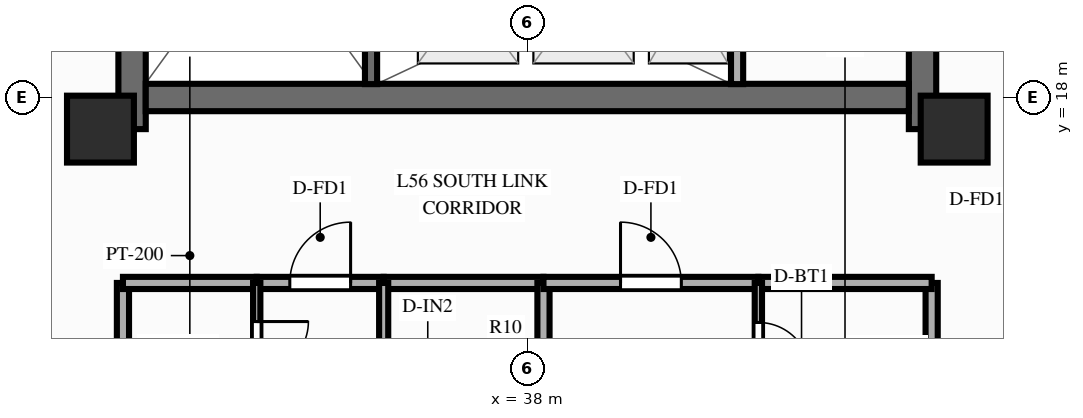
"""IFC4 building model, lengths in metres.
Left out: names, types, materials, properties, quantities, classifications, styles, units other than length and angle.
Written with IfcOpenShell. Run it as: python <this file> out.ifc"""

import sys

from ifc_helpers import new_model, si_unit, direction, frame, frame_2d, origin, origin_2d, place, context, subcontext, project, spatial, rectangle, extrude, source, transform, mapped, element, fill, save


model = new_model("IFC4")
c1 = context("Model", 3, precision=1e-05, world=origin(), true_north=direction((0.0, 1.0)))
c2 = subcontext(c1, "Body", "Model", "MODEL_VIEW")
j1 = project(units=[si_unit("LENGTHUNIT", "METRE"), si_unit("PLANEANGLEUNIT", "RADIAN")], contexts=[c1])
p1 = place(None, origin())
s1 = spatial("IfcSite", under=j1, at=p1, CompositionType="ELEMENT")
p2 = place(p1, origin())
s2 = spatial("IfcBuilding", under=s1, at=p2, CompositionType="ELEMENT")
p3 = place(p2, frame((0.0, 0.0, 179.8)))
s3 = spatial("IfcBuildingStorey", under=s2, at=p3, CompositionType="ELEMENT", Elevation=179.8)
p4 = place(p3, frame((31.5, 17.48, 0.0), z_axis=(0.0, 0.0, 1.0), x_axis=(0.0, 1.0, 0.0)))
e1 = element("IfcWall", 1, at=p4, inside=s3, PredefinedType="SHEAR", context=c2, shape_type="SweptSolid", body=[
    extrude(rectangle(XDim=19.04, YDim=0.45, at=frame_2d((9.52, 0.0))), origin(), (0.0, 0.0, 1.0), 3.0),
])
p5 = place(p4, frame((6.32, 0.0, 0.0)))
e2 = element("IfcOpeningElement", 2, at=p5, cuts=e1, PredefinedType="OPENING", context=c2, shape_type="SweptSolid", body=[
    extrude(rectangle(XDim=1.1, YDim=2.15, at=frame_2d((0.55, 1.075))), frame((0.0, 0.237, 0.0), z_axis=(0.0, -1.0, 0.0), x_axis=(1.0, 0.0, 0.0)), (0.0, 0.0, 1.0), 0.474),
])
p6 = place(p3, frame((44.5, 17.48, 0.0), z_axis=(0.0, 0.0, 1.0), x_axis=(0.0, 1.0, 0.0)))
e3 = element("IfcWall", 3, at=p6, inside=s3, PredefinedType="SHEAR", context=c2, shape_type="SweptSolid", body=[
    extrude(rectangle(XDim=19.04, YDim=0.45, at=frame_2d((9.52, 0.0))), origin(), (0.0, 0.0, 1.0), 3.0),
])
p7 = place(p6, frame((12.67, 0.0, 0.0), z_axis=(0.0, 0.0, 1.0), x_axis=(-1.0, 0.0, 0.0)))
e4 = element("IfcOpeningElement", 4, at=p7, cuts=e3, PredefinedType="OPENING", context=c2, shape_type="SweptSolid", body=[
    extrude(rectangle(XDim=1.1, YDim=2.15, at=frame_2d((0.55, 1.075))), frame((0.0, 0.237, 0.0), z_axis=(0.0, -1.0, 0.0), x_axis=(1.0, 0.0, 0.0)), (0.0, 0.0, 1.0), 0.474),
])
p8 = place(p3, frame((31.725, 18.0, 0.0), z_axis=(0.0, 0.0, 1.0), x_axis=(1.0, 0.0, 0.0)))
e5 = element("IfcWall", 5, at=p8, inside=s3, PredefinedType="SHEAR", context=c2, shape_type="SweptSolid", body=[
    extrude(rectangle(XDim=12.55, YDim=0.45, at=frame_2d((6.275, 0.0))), origin(), (0.0, 0.0, 1.0), 3.0),
])
m1 = source(origin(), c2, "Body", "SweptSolid", [
    extrude(rectangle(XDim=1.1, YDim=1.1, at=origin_2d()), origin(), (0.0, 0.0, 1.0), 3.0),
])
for number, where, z_axis, x_axis in (
    (6, (30.98, 17.48, 0.0), (0.0, 0.0, 1.0), (1.0, 0.0, 0.0)),
    (7, (45.02, 17.48, 0.0), (0.0, 0.0, 1.0), (1.0, 0.0, 0.0)),
):
    element("IfcColumn", number, at=place(p3, frame(where, z_axis=z_axis, x_axis=x_axis)), inside=s3, PredefinedType="COLUMN", context=c2, shape_type="MappedRepresentation", body=[
        mapped(m1, transform((0.0, 0.0, 0.0), scale=1.0)),
    ])
p9 = place(p3, frame((41.45, 18.22, 0.0), z_axis=(0.0, 0.0, 1.0), x_axis=(0.0, 1.0, 0.0)))
e8 = element("IfcWall", 8, at=p9, inside=s3, PredefinedType="PARTITIONING", context=c2, shape_type="SweptSolid", body=[
    extrude(rectangle(XDim=2.86, YDim=0.2, at=frame_2d((1.43, 0.0))), origin(), (0.0, 0.0, 1.0), 2.79),
])
p10 = place(p3, frame((35.43, 18.22, 0.0), z_axis=(0.0, 0.0, 1.0), x_axis=(0.0, 1.0, 0.0)))
e9 = element("IfcWall", 9, at=p10, inside=s3, PredefinedType="SOLIDWALL", context=c2, shape_type="SweptSolid", body=[
    extrude(rectangle(XDim=7.22, YDim=0.2, at=frame_2d((3.61, 0.0))), origin(), (0.0, 0.0, 1.0), 2.79),
])
p11 = place(p10, frame((6.68, 0.0, 0.0), z_axis=(0.0, 0.0, 1.0), x_axis=(-1.0, 0.0, 0.0)))
e10 = element("IfcOpeningElement", 10, at=p11, cuts=e9, PredefinedType="OPENING", context=c2, shape_type="SweptSolid", body=[
    extrude(rectangle(XDim=1.1, YDim=2.15, at=frame_2d((0.55, 1.075))), frame((0.0, 0.112, 0.0), z_axis=(0.0, -1.0, 0.0), x_axis=(1.0, 0.0, 0.0)), (0.0, 0.0, 1.0), 0.224),
])
for number, where, z_axis, x_axis in (
    (11, (31.35, 14.95, 0.0), (0.0, 0.0, 1.0), (0.0, -1.0, 0.0)),
    (12, (44.65, 14.95, 0.0), (0.0, 0.0, 1.0), (0.0, -1.0, 0.0)),
):
    element("IfcWall", number, at=place(p3, frame(where, z_axis=z_axis, x_axis=x_axis)), inside=s3, PredefinedType="PARTITIONING", context=c2, shape_type="SweptSolid", body=[
        extrude(rectangle(XDim=8.8, YDim=0.2, at=frame_2d((4.4, 0.0))), origin(), (0.0, 0.0, 1.0), 2.39),
    ])
p12 = place(p3, frame((31.35, 14.95, 0.0), z_axis=(0.0, 0.0, 1.0), x_axis=(1.0, 0.0, 0.0)))
e13 = element("IfcWall", 13, at=p12, inside=s3, PredefinedType="PARTITIONING", context=c2, shape_type="SweptSolid", body=[
    extrude(rectangle(XDim=2.2, YDim=0.2, at=frame_2d((1.1, 0.0))), origin(), (0.0, 0.0, 1.0), 2.79),
])
p13 = place(p3, frame((33.55, 14.95, 0.0), z_axis=(0.0, 0.0, 1.0), x_axis=(1.0, 0.0, 0.0)))
e14 = element("IfcWall", 14, at=p13, inside=s3, PredefinedType="PARTITIONING", context=c2, shape_type="SweptSolid", body=[
    extrude(rectangle(XDim=2.088, YDim=0.2, at=frame_2d((1.044, 0.0))), origin(), (0.0, 0.0, 1.0), 2.79),
])
p14 = place(p13, frame((0.544, 0.0, 0.0)))
e15 = element("IfcOpeningElement", 15, at=p14, cuts=e14, PredefinedType="OPENING", context=c2, shape_type="SweptSolid", body=[
    extrude(rectangle(XDim=1.0, YDim=2.15, at=frame_2d((0.5, 1.075))), frame((0.0, 0.112, 0.0), z_axis=(0.0, -1.0, 0.0), x_axis=(1.0, 0.0, 0.0)), (0.0, 0.0, 1.0), 0.224),
])
p15 = place(p3, frame((35.638, 14.95, 0.0), z_axis=(0.0, 0.0, 1.0), x_axis=(1.0, 0.0, 0.0)))
e16 = element("IfcWall", 16, at=p15, inside=s3, PredefinedType="PARTITIONING", context=c2, shape_type="SweptSolid", body=[
    extrude(rectangle(XDim=2.628, YDim=0.2, at=frame_2d((1.314, 0.0))), origin(), (0.0, 0.0, 1.0), 2.79),
])
p16 = place(p3, frame((33.55, 14.95, 0.0), z_axis=(0.0, 0.0, 1.0), x_axis=(0.0, -1.0, 0.0)))
e17 = element("IfcWall", 17, at=p16, inside=s3, PredefinedType="PARTITIONING", context=c2, shape_type="SweptSolid", body=[
    extrude(rectangle(XDim=2.12, YDim=0.12, at=frame_2d((1.06, 0.0))), origin(), (0.0, 0.0, 1.0), 2.79),
])
p17 = place(p16, frame((0.635, 0.0, 0.0)))
e18 = element("IfcOpeningElement", 18, at=p17, cuts=e17, PredefinedType="OPENING", context=c2, shape_type="SweptSolid", body=[
    extrude(rectangle(XDim=0.85, YDim=2.05, at=frame_2d((0.425, 1.025))), frame((0.0, 0.072, 0.0), z_axis=(0.0, -1.0, 0.0), x_axis=(1.0, 0.0, 0.0)), (0.0, 0.0, 1.0), 0.144),
])
p18 = place(p3, frame((35.638, 14.95, 0.0), z_axis=(0.0, 0.0, 1.0), x_axis=(0.0, -1.0, 0.0)))
e19 = element("IfcWall", 19, at=p18, inside=s3, PredefinedType="PARTITIONING", context=c2, shape_type="SweptSolid", body=[
    extrude(rectangle(XDim=3.16, YDim=0.15, at=frame_2d((1.58, 0.0))), origin(), (0.0, 0.0, 1.0), 2.79),
])
p19 = place(p18, frame((1.13, 0.0, 0.0)))
e20 = element("IfcOpeningElement", 20, at=p19, cuts=e19, PredefinedType="OPENING", context=c2, shape_type="SweptSolid", body=[
    extrude(rectangle(XDim=0.9, YDim=2.1, at=frame_2d((0.45, 1.05))), frame((0.0, 0.087, 0.0), z_axis=(0.0, -1.0, 0.0), x_axis=(1.0, 0.0, 0.0)), (0.0, 0.0, 1.0), 0.174),
])
p20 = place(p3, frame((38.266, 14.95, 0.0), z_axis=(0.0, 0.0, 1.0), x_axis=(0.0, -1.0, 0.0)))
e21 = element("IfcWall", 21, at=p20, inside=s3, PredefinedType="PARTITIONING", context=c2, shape_type="SweptSolid", body=[
    extrude(rectangle(XDim=8.8, YDim=0.2, at=frame_2d((4.4, 0.0))), origin(), (0.0, 0.0, 1.0), 2.79),
])
p21 = place(p3, frame((38.266, 14.95, 0.0), z_axis=(0.0, 0.0, 1.0), x_axis=(1.0, 0.0, 0.0)))
e22 = element("IfcWall", 22, at=p21, inside=s3, PredefinedType="PARTITIONING", context=c2, shape_type="SweptSolid", body=[
    extrude(rectangle(XDim=3.534, YDim=0.2, at=frame_2d((1.767, 0.0))), origin(), (0.0, 0.0, 1.0), 2.79),
])
p22 = place(p21, frame((1.267, 0.0, 0.0)))
e23 = element("IfcOpeningElement", 23, at=p22, cuts=e22, PredefinedType="OPENING", context=c2, shape_type="SweptSolid", body=[
    extrude(rectangle(XDim=1.0, YDim=2.15, at=frame_2d((0.5, 1.075))), frame((0.0, 0.112, 0.0), z_axis=(0.0, -1.0, 0.0), x_axis=(1.0, 0.0, 0.0)), (0.0, 0.0, 1.0), 0.224),
])
p23 = place(p3, frame((41.8, 14.95, 0.0), z_axis=(0.0, 0.0, 1.0), x_axis=(1.0, 0.0, 0.0)))
e24 = element("IfcWall", 24, at=p23, inside=s3, PredefinedType="PARTITIONING", context=c2, shape_type="SweptSolid", body=[
    extrude(rectangle(XDim=2.85, YDim=0.2, at=frame_2d((1.425, 0.0))), origin(), (0.0, 0.0, 1.0), 2.79),
])
p24 = place(p3, frame((41.8, 14.95, 0.0), z_axis=(0.0, 0.0, 1.0), x_axis=(0.0, -1.0, 0.0)))
e25 = element("IfcWall", 25, at=p24, inside=s3, PredefinedType="PARTITIONING", context=c2, shape_type="SweptSolid", body=[
    extrude(rectangle(XDim=2.15, YDim=0.12, at=frame_2d((1.075, 0.0))), origin(), (0.0, 0.0, 1.0), 2.79),
])
p25 = place(p24, frame((0.65, 0.0, 0.0)))
e26 = element("IfcOpeningElement", 26, at=p25, cuts=e25, PredefinedType="OPENING", context=c2, shape_type="SweptSolid", body=[
    extrude(rectangle(XDim=0.85, YDim=2.05, at=frame_2d((0.425, 1.025))), frame((0.0, 0.072, 0.0), z_axis=(0.0, -1.0, 0.0), x_axis=(1.0, 0.0, 0.0)), (0.0, 0.0, 1.0), 0.144),
])
m2 = source(origin(), c2, "Body", "SweptSolid", [
    extrude(rectangle(XDim=1.0, YDim=2.15, at=frame_2d((0.5, 1.075))), frame((0.0, 0.025, 0.0), z_axis=(0.0, -1.0, 0.0), x_axis=(1.0, 0.0, 0.0)), (0.0, 0.0, 1.0), 0.05),
])
p26 = place(p14, origin())
e27 = element("IfcDoor", 27, at=p26, inside=s3, OperationType="SINGLE_SWING_RIGHT", PredefinedType="DOOR", context=c2, shape_type="MappedRepresentation", body=[
    mapped(m2, transform((0.0, 0.0, 0.0), scale=1.0)),
])
fill(e15, e27)
m3 = source(origin(), c2, "Body", "SweptSolid", [
    extrude(rectangle(XDim=0.85, YDim=2.05, at=frame_2d((0.425, 1.025))), frame((0.0, 0.025, 0.0), z_axis=(0.0, -1.0, 0.0), x_axis=(1.0, 0.0, 0.0)), (0.0, 0.0, 1.0), 0.05),
])
p27 = place(p17, origin())
e28 = element("IfcDoor", 28, at=p27, inside=s3, OperationType="SINGLE_SWING_LEFT", PredefinedType="DOOR", context=c2, shape_type="MappedRepresentation", body=[
    mapped(m3, transform((0.0, 0.0, 0.0), scale=1.0)),
])
fill(e18, e28)
p28 = place(p22, origin())
e29 = element("IfcDoor", 29, at=p28, inside=s3, OperationType="SINGLE_SWING_LEFT", PredefinedType="DOOR", context=c2, shape_type="MappedRepresentation", body=[
    mapped(m2, transform((0.0, 0.0, 0.0), scale=1.0)),
])
fill(e23, e29)
p29 = place(p25, origin())
e30 = element("IfcDoor", 30, at=p29, inside=s3, OperationType="SINGLE_SWING_RIGHT", PredefinedType="DOOR", context=c2, shape_type="MappedRepresentation", body=[
    mapped(m3, transform((0.0, 0.0, 0.0), scale=1.0)),
])
fill(e26, e30)
save(model, sys.argv[1])
